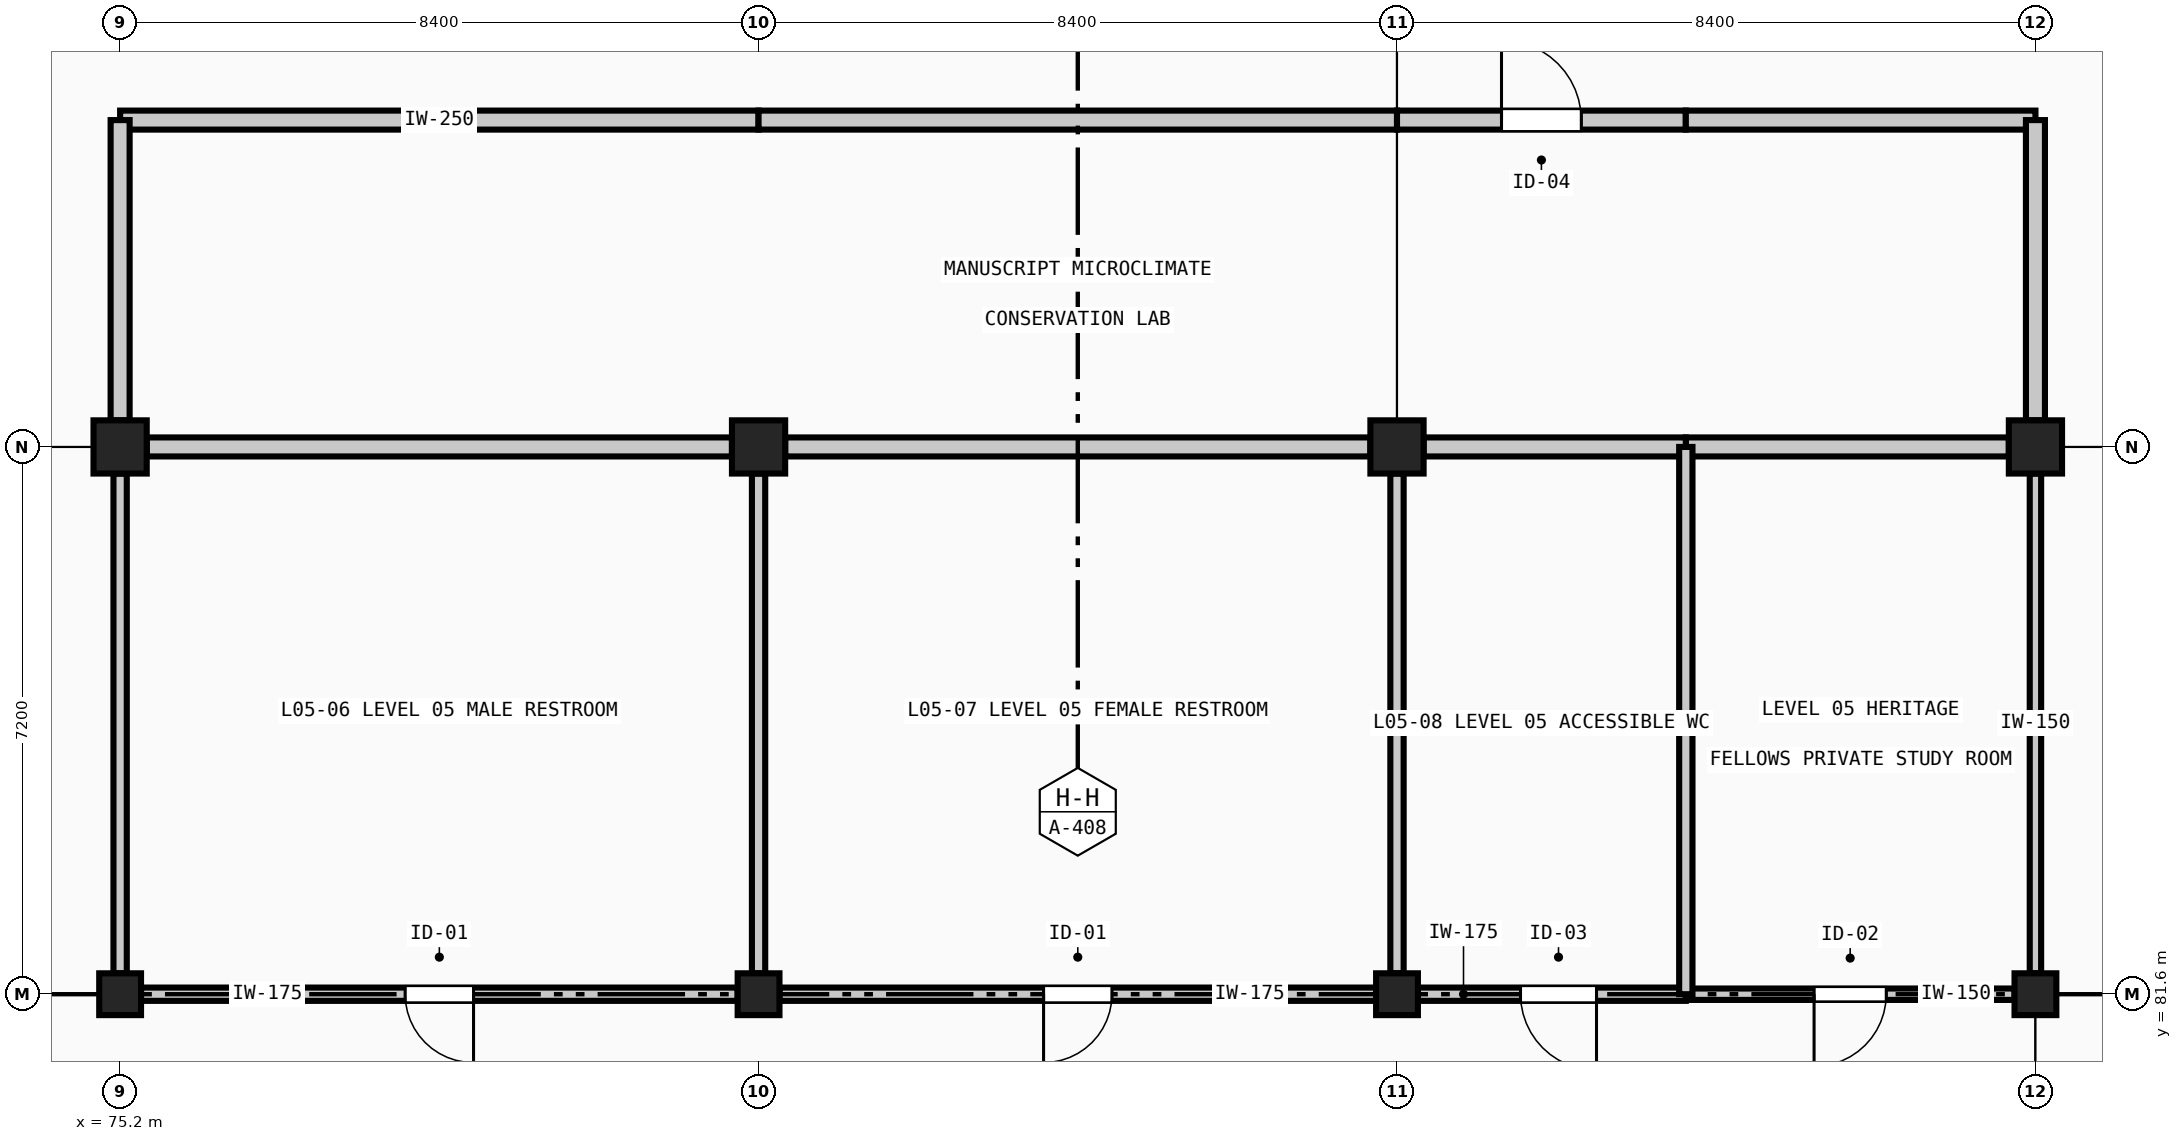
"""IFC4 building model, lengths in metres.
Left out: names, types, materials, properties, quantities, classifications, styles, units other than length and angle.
Written with IfcOpenShell. Run it as: python <this file> out.ifc"""

import sys

from ifc_helpers import new_model, si_unit, direction, frame, frame_2d, origin, origin_2d, place, context, subcontext, project, spatial, rectangle, extrude, element, fill, save


model = new_model("IFC4")
c1 = context("Model", 3, precision=1e-05, world=origin(), true_north=direction((0.0, 1.0)))
c2 = subcontext(c1, "Body", "Model", "MODEL_VIEW")
j1 = project(units=[si_unit("LENGTHUNIT", "METRE"), si_unit("PLANEANGLEUNIT", "RADIAN")], contexts=[c1])
p1 = place(None, origin())
s1 = spatial("IfcSite", under=j1, at=p1, CompositionType="ELEMENT")
p2 = place(p1, origin())
s2 = spatial("IfcBuilding", under=s1, at=p2, CompositionType="ELEMENT")
p3 = place(p2, frame((0.0, 0.0, 23.36)))
s3 = spatial("IfcBuildingStorey", under=s2, at=p3, CompositionType="ELEMENT", Elevation=23.36)
p4 = place(p3, frame((75.2, 81.6, 0.0), z_axis=(0.0, 0.0, 1.0), x_axis=(1.0, 0.0, 0.0)))
e1 = element("IfcColumn", 1, at=p4, inside=s3, PredefinedType="COLUMN", context=c2, shape_type="SweptSolid", body=[
    extrude(rectangle(XDim=0.55, YDim=0.55, at=origin_2d()), origin(), (0.0, 0.0, 1.0), 4.48),
])
p5 = place(p3, frame((75.2, 88.8, 0.0), z_axis=(0.0, 0.0, 1.0), x_axis=(1.0, 0.0, 0.0)))
e2 = element("IfcColumn", 2, at=p5, inside=s3, PredefinedType="COLUMN", context=c2, shape_type="SweptSolid", body=[
    extrude(rectangle(XDim=0.7, YDim=0.7, at=origin_2d()), origin(), (0.0, 0.0, 1.0), 4.48),
])
p6 = place(p3, frame((83.6, 81.6, 0.0), z_axis=(0.0, 0.0, 1.0), x_axis=(1.0, 0.0, 0.0)))
e3 = element("IfcColumn", 3, at=p6, inside=s3, PredefinedType="COLUMN", context=c2, shape_type="SweptSolid", body=[
    extrude(rectangle(XDim=0.55, YDim=0.55, at=origin_2d()), origin(), (0.0, 0.0, 1.0), 4.48),
])
p7 = place(p3, frame((83.6, 88.8, 0.0), z_axis=(0.0, 0.0, 1.0), x_axis=(1.0, 0.0, 0.0)))
e4 = element("IfcColumn", 4, at=p7, inside=s3, PredefinedType="COLUMN", context=c2, shape_type="SweptSolid", body=[
    extrude(rectangle(XDim=0.7, YDim=0.7, at=origin_2d()), origin(), (0.0, 0.0, 1.0), 4.48),
])
p8 = place(p3, frame((92.0, 81.6, 0.0), z_axis=(0.0, 0.0, 1.0), x_axis=(1.0, 0.0, 0.0)))
e5 = element("IfcColumn", 5, at=p8, inside=s3, PredefinedType="COLUMN", context=c2, shape_type="SweptSolid", body=[
    extrude(rectangle(XDim=0.55, YDim=0.55, at=origin_2d()), origin(), (0.0, 0.0, 1.0), 4.48),
])
p9 = place(p3, frame((92.0, 88.8, 0.0), z_axis=(0.0, 0.0, 1.0), x_axis=(1.0, 0.0, 0.0)))
e6 = element("IfcColumn", 6, at=p9, inside=s3, PredefinedType="COLUMN", context=c2, shape_type="SweptSolid", body=[
    extrude(rectangle(XDim=0.7, YDim=0.7, at=origin_2d()), origin(), (0.0, 0.0, 1.0), 4.48),
])
p10 = place(p3, frame((100.4, 81.6, 0.0), z_axis=(0.0, 0.0, 1.0), x_axis=(1.0, 0.0, 0.0)))
e7 = element("IfcColumn", 7, at=p10, inside=s3, PredefinedType="COLUMN", context=c2, shape_type="SweptSolid", body=[
    extrude(rectangle(XDim=0.55, YDim=0.55, at=origin_2d()), origin(), (0.0, 0.0, 1.0), 4.48),
])
p11 = place(p3, frame((100.4, 88.8, 0.0), z_axis=(0.0, 0.0, 1.0), x_axis=(1.0, 0.0, 0.0)))
e8 = element("IfcColumn", 8, at=p11, inside=s3, PredefinedType="COLUMN", context=c2, shape_type="SweptSolid", body=[
    extrude(rectangle(XDim=0.7, YDim=0.7, at=origin_2d()), origin(), (0.0, 0.0, 1.0), 4.48),
])
p12 = place(p3, frame((75.2, 93.1, 0.0), z_axis=(0.0, 0.0, 1.0), x_axis=(1.0, 0.0, 0.0)))
e9 = element("IfcWall", 9, at=p12, inside=s3, PredefinedType="SOLIDWALL", context=c2, shape_type="SweptSolid", body=[
    extrude(rectangle(XDim=8.4, YDim=0.25, at=frame_2d((4.2, 0.0))), origin(), (0.0, 0.0, 1.0), 3.13),
])
p13 = place(p3, frame((83.6, 93.1, 0.0), z_axis=(0.0, 0.0, 1.0), x_axis=(1.0, 0.0, 0.0)))
e10 = element("IfcWall", 10, at=p13, inside=s3, PredefinedType="SOLIDWALL", context=c2, shape_type="SweptSolid", body=[
    extrude(rectangle(XDim=8.4, YDim=0.25, at=frame_2d((4.2, 0.0))), origin(), (0.0, 0.0, 1.0), 3.13),
])
p14 = place(p3, frame((92.0, 93.1, 0.0), z_axis=(0.0, 0.0, 1.0), x_axis=(1.0, 0.0, 0.0)))
e11 = element("IfcWall", 11, at=p14, inside=s3, PredefinedType="SOLIDWALL", context=c2, shape_type="SweptSolid", body=[
    extrude(rectangle(XDim=3.8, YDim=0.25, at=frame_2d((1.9, 0.0))), origin(), (0.0, 0.0, 1.0), 3.13),
])
p15 = place(p14, frame((1.375, 0.0, 0.0)))
e12 = element("IfcOpeningElement", 12, at=p15, cuts=e11, PredefinedType="OPENING", context=c2, shape_type="SweptSolid", body=[
    extrude(rectangle(XDim=1.05, YDim=2.2, at=frame_2d((0.525, 1.1))), frame((0.0, 0.135, 0.0), z_axis=(0.0, -1.0, 0.0), x_axis=(1.0, 0.0, 0.0)), (0.0, 0.0, 1.0), 0.27),
])
p16 = place(p3, frame((95.8, 93.1, 0.0), z_axis=(0.0, 0.0, 1.0), x_axis=(1.0, 0.0, 0.0)))
e13 = element("IfcWall", 13, at=p16, inside=s3, PredefinedType="SOLIDWALL", context=c2, shape_type="SweptSolid", body=[
    extrude(rectangle(XDim=4.6, YDim=0.25, at=frame_2d((2.3, 0.0))), origin(), (0.0, 0.0, 1.0), 3.13),
])
p17 = place(p3, frame((83.325, 81.6, 0.0), z_axis=(0.0, 0.0, 1.0), x_axis=(-1.0, 0.0, 0.0)))
e14 = element("IfcWall", 14, at=p17, inside=s3, PredefinedType="PLUMBINGWALL", context=c2, shape_type="SweptSolid", body=[
    extrude(rectangle(XDim=7.85, YDim=0.175, at=frame_2d((3.925, 0.0))), origin(), (0.0, 0.0, 1.0), 4.255),
])
p18 = place(p17, frame((3.475, 0.0, 0.0)))
e15 = element("IfcOpeningElement", 15, at=p18, cuts=e14, PredefinedType="OPENING", context=c2, shape_type="SweptSolid", body=[
    extrude(rectangle(XDim=0.9, YDim=2.1, at=frame_2d((0.45, 1.05))), frame((0.0, 0.097, 0.0), z_axis=(0.0, -1.0, 0.0), x_axis=(1.0, 0.0, 0.0)), (0.0, 0.0, 1.0), 0.195),
])
p19 = place(p3, frame((91.725, 81.6, 0.0), z_axis=(0.0, 0.0, 1.0), x_axis=(-1.0, 0.0, 0.0)))
e16 = element("IfcWall", 16, at=p19, inside=s3, PredefinedType="PLUMBINGWALL", context=c2, shape_type="SweptSolid", body=[
    extrude(rectangle(XDim=7.85, YDim=0.175, at=frame_2d((3.925, 0.0))), origin(), (0.0, 0.0, 1.0), 4.255),
])
p20 = place(p19, frame((3.475, 0.0, 0.0)))
e17 = element("IfcOpeningElement", 17, at=p20, cuts=e16, PredefinedType="OPENING", context=c2, shape_type="SweptSolid", body=[
    extrude(rectangle(XDim=0.9, YDim=2.1, at=frame_2d((0.45, 1.05))), frame((0.0, 0.097, 0.0), z_axis=(0.0, -1.0, 0.0), x_axis=(1.0, 0.0, 0.0)), (0.0, 0.0, 1.0), 0.195),
])
p21 = place(p3, frame((95.8, 81.6, 0.0), z_axis=(0.0, 0.0, 1.0), x_axis=(-1.0, 0.0, 0.0)))
e18 = element("IfcWall", 18, at=p21, inside=s3, PredefinedType="PLUMBINGWALL", context=c2, shape_type="SweptSolid", body=[
    extrude(rectangle(XDim=3.525, YDim=0.175, at=frame_2d((1.763, 0.0))), origin(), (0.0, 0.0, 1.0), 4.255),
])
p22 = place(p21, frame((1.175, 0.0, 0.0)))
e19 = element("IfcOpeningElement", 19, at=p22, cuts=e18, PredefinedType="OPENING", context=c2, shape_type="SweptSolid", body=[
    extrude(rectangle(XDim=1.0, YDim=2.15, at=frame_2d((0.5, 1.075))), frame((0.0, 0.097, 0.0), z_axis=(0.0, -1.0, 0.0), x_axis=(1.0, 0.0, 0.0)), (0.0, 0.0, 1.0), 0.195),
])
p23 = place(p3, frame((100.125, 81.6, 0.0), z_axis=(0.0, 0.0, 1.0), x_axis=(-1.0, 0.0, 0.0)))
e20 = element("IfcWall", 20, at=p23, inside=s3, PredefinedType="PARTITIONING", context=c2, shape_type="SweptSolid", body=[
    extrude(rectangle(XDim=4.325, YDim=0.15, at=frame_2d((2.163, 0.0))), origin(), (0.0, 0.0, 1.0), 4.255),
])
p24 = place(p23, frame((1.688, 0.0, 0.0)))
e21 = element("IfcOpeningElement", 21, at=p24, cuts=e20, PredefinedType="OPENING", context=c2, shape_type="SweptSolid", body=[
    extrude(rectangle(XDim=0.95, YDim=2.15, at=frame_2d((0.475, 1.075))), frame((0.0, 0.085, 0.0), z_axis=(0.0, -1.0, 0.0), x_axis=(1.0, 0.0, 0.0)), (0.0, 0.0, 1.0), 0.17),
])
p25 = place(p3, frame((100.05, 88.8, 0.0), z_axis=(0.0, 0.0, 1.0), x_axis=(-1.0, 0.0, 0.0)))
e22 = element("IfcWall", 22, at=p25, inside=s3, PredefinedType="SOLIDWALL", context=c2, shape_type="SweptSolid", body=[
    extrude(rectangle(XDim=4.25, YDim=0.25, at=frame_2d((2.125, 0.0))), origin(), (0.0, 0.0, 1.0), 3.53),
])
p26 = place(p3, frame((95.8, 88.8, 0.0), z_axis=(0.0, 0.0, 1.0), x_axis=(-1.0, 0.0, 0.0)))
e23 = element("IfcWall", 23, at=p26, inside=s3, PredefinedType="SOLIDWALL", context=c2, shape_type="SweptSolid", body=[
    extrude(rectangle(XDim=3.45, YDim=0.25, at=frame_2d((1.725, 0.0))), origin(), (0.0, 0.0, 1.0), 3.53),
])
for number, where, z_axis, x_axis in (
    (24, (91.65, 88.8, 0.0), (0.0, 0.0, 1.0), (-1.0, 0.0, 0.0)),
    (25, (83.25, 88.8, 0.0), (0.0, 0.0, 1.0), (-1.0, 0.0, 0.0)),
):
    element("IfcWall", number, at=place(p3, frame(where, z_axis=z_axis, x_axis=x_axis)), inside=s3, PredefinedType="SOLIDWALL", context=c2, shape_type="SweptSolid", body=[
        extrude(rectangle(XDim=7.7, YDim=0.25, at=frame_2d((3.85, 0.0))), origin(), (0.0, 0.0, 1.0), 3.53),
    ])
for number, where, z_axis, x_axis in (
    (26, (75.2, 89.15, 0.0), (0.0, 0.0, 1.0), (0.0, 1.0, 0.0)),
    (27, (100.4, 93.1, 0.0), (0.0, 0.0, 1.0), (0.0, -1.0, 0.0)),
):
    element("IfcWall", number, at=place(p3, frame(where, z_axis=z_axis, x_axis=x_axis)), inside=s3, PredefinedType="SOLIDWALL", context=c2, shape_type="SweptSolid", body=[
        extrude(rectangle(XDim=3.95, YDim=0.25, at=frame_2d((1.975, 0.0))), origin(), (0.0, 0.0, 1.0), 3.13),
    ])
for number, where, z_axis, x_axis in (
    (28, (75.2, 81.875, 0.0), (0.0, 0.0, 1.0), (0.0, 1.0, 0.0)),
    (29, (83.6, 88.45, 0.0), (0.0, 0.0, 1.0), (0.0, -1.0, 0.0)),
    (30, (92.0, 88.45, 0.0), (0.0, 0.0, 1.0), (0.0, -1.0, 0.0)),
):
    element("IfcWall", number, at=place(p3, frame(where, z_axis=z_axis, x_axis=x_axis)), inside=s3, PredefinedType="PLUMBINGWALL", context=c2, shape_type="SweptSolid", body=[
        extrude(rectangle(XDim=6.575, YDim=0.175, at=frame_2d((3.288, 0.0))), origin(), (0.0, 0.0, 1.0), 4.255),
    ])
p27 = place(p3, frame((95.8, 88.8, 0.0), z_axis=(0.0, 0.0, 1.0), x_axis=(0.0, -1.0, 0.0)))
e31 = element("IfcWall", 31, at=p27, inside=s3, PredefinedType="PLUMBINGWALL", context=c2, shape_type="SweptSolid", body=[
    extrude(rectangle(XDim=7.2, YDim=0.175, at=frame_2d((3.6, 0.0))), origin(), (0.0, 0.0, 1.0), 4.255),
])
p28 = place(p3, frame((100.4, 88.45, 0.0), z_axis=(0.0, 0.0, 1.0), x_axis=(0.0, -1.0, 0.0)))
e32 = element("IfcWall", 32, at=p28, inside=s3, PredefinedType="PARTITIONING", context=c2, shape_type="SweptSolid", body=[
    extrude(rectangle(XDim=6.575, YDim=0.15, at=frame_2d((3.288, 0.0))), origin(), (0.0, 0.0, 1.0), 4.255),
])
p29 = place(p15, origin())
e33 = element("IfcDoor", 33, at=p29, inside=s3, OperationType="SINGLE_SWING_LEFT", PredefinedType="DOOR", context=c2, shape_type="SweptSolid", body=[
    extrude(rectangle(XDim=1.05, YDim=2.2, at=frame_2d((0.525, 1.1))), frame((0.0, 0.025, 0.0), z_axis=(0.0, -1.0, 0.0), x_axis=(1.0, 0.0, 0.0)), (0.0, 0.0, 1.0), 0.05),
])
fill(e12, e33)
p30 = place(p18, origin())
e34 = element("IfcDoor", 34, at=p30, inside=s3, OperationType="SINGLE_SWING_LEFT", PredefinedType="DOOR", context=c2, shape_type="SweptSolid", body=[
    extrude(rectangle(XDim=0.9, YDim=2.1, at=frame_2d((0.45, 1.05))), frame((0.0, 0.025, 0.0), z_axis=(0.0, -1.0, 0.0), x_axis=(1.0, 0.0, 0.0)), (0.0, 0.0, 1.0), 0.05),
])
fill(e15, e34)
p31 = place(p20, origin())
e35 = element("IfcDoor", 35, at=p31, inside=s3, OperationType="SINGLE_SWING_RIGHT", PredefinedType="DOOR", context=c2, shape_type="SweptSolid", body=[
    extrude(rectangle(XDim=0.9, YDim=2.1, at=frame_2d((0.45, 1.05))), frame((0.0, 0.025, 0.0), z_axis=(0.0, -1.0, 0.0), x_axis=(1.0, 0.0, 0.0)), (0.0, 0.0, 1.0), 0.05),
])
fill(e17, e35)
p32 = place(p22, origin())
e36 = element("IfcDoor", 36, at=p32, inside=s3, OperationType="SINGLE_SWING_LEFT", PredefinedType="DOOR", context=c2, shape_type="SweptSolid", body=[
    extrude(rectangle(XDim=1.0, YDim=2.15, at=frame_2d((0.5, 1.075))), frame((0.0, 0.025, 0.0), z_axis=(0.0, -1.0, 0.0), x_axis=(1.0, 0.0, 0.0)), (0.0, 0.0, 1.0), 0.05),
])
fill(e19, e36)
p33 = place(p24, origin())
e37 = element("IfcDoor", 37, at=p33, inside=s3, OperationType="SINGLE_SWING_RIGHT", PredefinedType="DOOR", context=c2, shape_type="SweptSolid", body=[
    extrude(rectangle(XDim=0.95, YDim=2.15, at=frame_2d((0.475, 1.075))), frame((0.0, 0.025, 0.0), z_axis=(0.0, -1.0, 0.0), x_axis=(1.0, 0.0, 0.0)), (0.0, 0.0, 1.0), 0.05),
])
fill(e21, e37)
save(model, sys.argv[1])
